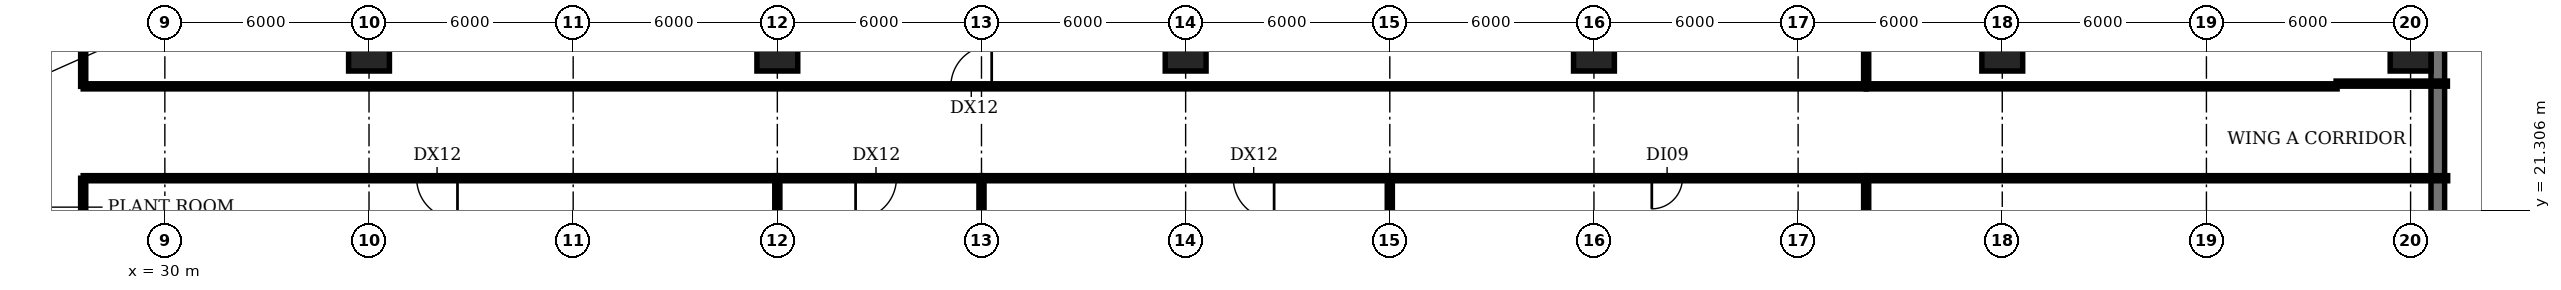
"""IFC4 building model, lengths in metres.
Left out: names, types, materials, properties, quantities, classifications, styles, units other than length and angle.
Written with IfcOpenShell. Run it as: python <this file> out.ifc"""

import sys

from ifc_helpers import new_model, si_unit, direction, frame, frame_2d, origin, origin_2d, place, context, subcontext, project, spatial, rectangle, extrude, element, fill, save


model = new_model("IFC4")
c1 = context("Model", 3, precision=1e-05, world=origin(), true_north=direction((0.0, 1.0)))
c2 = subcontext(c1, "Body", "Model", "MODEL_VIEW")
j1 = project(units=[si_unit("LENGTHUNIT", "METRE"), si_unit("PLANEANGLEUNIT", "RADIAN")], contexts=[c1])
p1 = place(None, origin())
s1 = spatial("IfcSite", under=j1, at=p1, CompositionType="ELEMENT")
p2 = place(p1, origin())
s2 = spatial("IfcBuilding", under=s1, at=p2, CompositionType="ELEMENT")
p3 = place(p2, frame((0.0, 0.0, -6.0)))
s3 = spatial("IfcBuildingStorey", under=s2, at=p3, CompositionType="ELEMENT", Elevation=-6.0)
for number, where, z_axis, x_axis in (
    (1, (36.0, 26.0, -0.3), (0.0, 0.0, 1.0), (1.0, 0.0, 0.0)),
    (2, (48.0, 26.0, -0.3), (0.0, 0.0, 1.0), (1.0, 0.0, 0.0)),
    (3, (60.0, 26.0, -0.3), (0.0, 0.0, 1.0), (1.0, 0.0, 0.0)),
    (4, (72.0, 26.0, -0.3), (0.0, 0.0, 1.0), (1.0, 0.0, 0.0)),
    (5, (84.0, 26.0, -0.3), (0.0, 0.0, 1.0), (1.0, 0.0, 0.0)),
    (6, (96.0, 26.0, -0.3), (0.0, 0.0, 1.0), (1.0, 0.0, 0.0)),
):
    element("IfcColumn", number, at=place(p3, frame(where, z_axis=z_axis, x_axis=x_axis)), inside=s3, PredefinedType="COLUMN", context=c2, shape_type="SweptSolid", body=[
        extrude(rectangle(XDim=1.2, YDim=1.2, at=origin_2d()), origin(), (0.0, 0.0, 1.0), 5.95),
    ])
p4 = place(p3, frame((96.8, -3.249, 0.0), z_axis=(0.0, 0.0, 1.0), x_axis=(0.0, 1.0, 0.0)))
e7 = element("IfcWall", 7, at=p4, inside=s3, PredefinedType="SOLIDWALL", context=c2, shape_type="SweptSolid", body=[
    extrude(rectangle(XDim=66.497, YDim=0.4, at=frame_2d((33.249, 0.0))), origin(), (0.0, 0.0, 1.0), 5.65),
])
p5 = place(p3, frame((27.6, -10.09, 0.0), z_axis=(0.0, 0.0, 1.0), x_axis=(0.0, 1.0, 0.0)))
e8 = element("IfcWall", 8, at=p5, inside=s3, PredefinedType="PARTITIONING", context=c2, shape_type="SweptSolid", body=[
    extrude(rectangle(XDim=32.34, YDim=0.15, at=frame_2d((16.17, 0.0))), origin(), (0.0, 0.0, 1.0), 4.7),
])
p6 = place(p3, frame((27.6, 24.95, 0.0), z_axis=(0.0, 0.0, 1.0), x_axis=(0.0, 1.0, 0.0)))
e9 = element("IfcWall", 9, at=p6, inside=s3, PredefinedType="PARTITIONING", context=c2, shape_type="SweptSolid", body=[
    extrude(rectangle(XDim=45.14, YDim=0.15, at=frame_2d((22.57, 0.0))), origin(), (0.0, 0.0, 1.0), 4.7),
])
p7 = place(p3, frame((27.6, 24.95, 0.0), z_axis=(0.0, 0.0, 1.0), x_axis=(1.0, 0.0, 0.0)))
e10 = element("IfcWall", 10, at=p7, inside=s3, PredefinedType="PARTITIONING", context=c2, shape_type="SweptSolid", body=[
    extrude(rectangle(XDim=52.4, YDim=0.15, at=frame_2d((26.2, 0.0))), origin(), (0.0, 0.0, 1.0), 4.7),
])
p8 = place(p7, frame((25.5, 0.0, 0.0)))
e11 = element("IfcOpeningElement", 11, at=p8, cuts=e10, PredefinedType="OPENING", context=c2, shape_type="SweptSolid", body=[
    extrude(rectangle(XDim=1.2, YDim=2.1, at=frame_2d((0.6, 1.05))), frame((0.0, 0.085, 0.0), z_axis=(0.0, -1.0, 0.0), x_axis=(1.0, 0.0, 0.0)), (0.0, 0.0, 1.0), 0.17),
])
p9 = place(p3, frame((48.0, -10.09, 0.0), z_axis=(0.0, 0.0, 1.0), x_axis=(0.0, 1.0, 0.0)))
e12 = element("IfcWall", 12, at=p9, inside=s3, PredefinedType="PARTITIONING", context=c2, shape_type="SweptSolid", body=[
    extrude(rectangle(XDim=32.34, YDim=0.15, at=frame_2d((16.17, 0.0))), origin(), (0.0, 0.0, 1.0), 4.7),
])
p10 = place(p3, frame((48.0, 22.25, 0.0), z_axis=(0.0, 0.0, 1.0), x_axis=(-1.0, 0.0, 0.0)))
e13 = element("IfcWall", 13, at=p10, inside=s3, PredefinedType="PARTITIONING", context=c2, shape_type="SweptSolid", body=[
    extrude(rectangle(XDim=20.4, YDim=0.15, at=frame_2d((10.2, 0.0))), origin(), (0.0, 0.0, 1.0), 4.7),
])
p11 = place(p10, frame((9.4, 0.0, 0.0)))
e14 = element("IfcOpeningElement", 14, at=p11, cuts=e13, PredefinedType="OPENING", context=c2, shape_type="SweptSolid", body=[
    extrude(rectangle(XDim=1.2, YDim=2.1, at=frame_2d((0.6, 1.05))), frame((0.0, 0.085, 0.0), z_axis=(0.0, -1.0, 0.0), x_axis=(1.0, 0.0, 0.0)), (0.0, 0.0, 1.0), 0.17),
])
p12 = place(p3, frame((54.0, -10.09, 0.0), z_axis=(0.0, 0.0, 1.0), x_axis=(0.0, 1.0, 0.0)))
e15 = element("IfcWall", 15, at=p12, inside=s3, PredefinedType="PARTITIONING", context=c2, shape_type="SweptSolid", body=[
    extrude(rectangle(XDim=32.34, YDim=0.15, at=frame_2d((16.17, 0.0))), origin(), (0.0, 0.0, 1.0), 4.7),
])
p13 = place(p3, frame((54.0, 22.25, 0.0), z_axis=(0.0, 0.0, 1.0), x_axis=(-1.0, 0.0, 0.0)))
e16 = element("IfcWall", 16, at=p13, inside=s3, PredefinedType="PARTITIONING", context=c2, shape_type="SweptSolid", body=[
    extrude(rectangle(XDim=6.0, YDim=0.15, at=frame_2d((3.0, 0.0))), origin(), (0.0, 0.0, 1.0), 4.7),
])
p14 = place(p13, frame((2.5, 0.0, 0.0)))
e17 = element("IfcOpeningElement", 17, at=p14, cuts=e16, PredefinedType="OPENING", context=c2, shape_type="SweptSolid", body=[
    extrude(rectangle(XDim=1.2, YDim=2.1, at=frame_2d((0.6, 1.05))), frame((0.0, 0.085, 0.0), z_axis=(0.0, -1.0, 0.0), x_axis=(1.0, 0.0, 0.0)), (0.0, 0.0, 1.0), 0.17),
])
p15 = place(p3, frame((66.0, -10.09, 0.0), z_axis=(0.0, 0.0, 1.0), x_axis=(0.0, 1.0, 0.0)))
e18 = element("IfcWall", 18, at=p15, inside=s3, PredefinedType="PARTITIONING", context=c2, shape_type="SweptSolid", body=[
    extrude(rectangle(XDim=32.34, YDim=0.15, at=frame_2d((16.17, 0.0))), origin(), (0.0, 0.0, 1.0), 4.7),
])
p16 = place(p3, frame((66.0, 22.25, 0.0), z_axis=(0.0, 0.0, 1.0), x_axis=(-1.0, 0.0, 0.0)))
e19 = element("IfcWall", 19, at=p16, inside=s3, PredefinedType="PARTITIONING", context=c2, shape_type="SweptSolid", body=[
    extrude(rectangle(XDim=12.0, YDim=0.15, at=frame_2d((6.0, 0.0))), origin(), (0.0, 0.0, 1.0), 4.7),
])
p17 = place(p16, frame((3.4, 0.0, 0.0)))
e20 = element("IfcOpeningElement", 20, at=p17, cuts=e19, PredefinedType="OPENING", context=c2, shape_type="SweptSolid", body=[
    extrude(rectangle(XDim=1.2, YDim=2.1, at=frame_2d((0.6, 1.05))), frame((0.0, 0.085, 0.0), z_axis=(0.0, -1.0, 0.0), x_axis=(1.0, 0.0, 0.0)), (0.0, 0.0, 1.0), 0.17),
])
p18 = place(p3, frame((80.0, -3.92, 0.0), z_axis=(0.0, 0.0, 1.0), x_axis=(0.0, 1.0, 0.0)))
e21 = element("IfcWall", 21, at=p18, inside=s3, PredefinedType="PARTITIONING", context=c2, shape_type="SweptSolid", body=[
    extrude(rectangle(XDim=26.17, YDim=0.15, at=frame_2d((13.085, 0.0))), origin(), (0.0, 0.0, 1.0), 4.7),
])
p19 = place(p3, frame((80.0, 22.25, 0.0), z_axis=(0.0, 0.0, 1.0), x_axis=(-1.0, 0.0, 0.0)))
e22 = element("IfcWall", 22, at=p19, inside=s3, PredefinedType="PARTITIONING", context=c2, shape_type="SweptSolid", body=[
    extrude(rectangle(XDim=14.0, YDim=0.15, at=frame_2d((7.0, 0.0))), origin(), (0.0, 0.0, 1.0), 4.7),
])
p20 = place(p19, frame((5.4, 0.0, 0.0)))
e23 = element("IfcOpeningElement", 23, at=p20, cuts=e22, PredefinedType="OPENING", context=c2, shape_type="SweptSolid", body=[
    extrude(rectangle(XDim=0.9, YDim=2.1, at=frame_2d((0.45, 1.05))), frame((0.0, 0.085, 0.0), z_axis=(0.0, -1.0, 0.0), x_axis=(1.0, 0.0, 0.0)), (0.0, 0.0, 1.0), 0.17),
])
p21 = place(p3, frame((80.0, 22.25, 0.0), z_axis=(0.0, 0.0, 1.0), x_axis=(1.0, 0.0, 0.0)))
e24 = element("IfcWall", 24, at=p21, inside=s3, PredefinedType="PARTITIONING", context=c2, shape_type="SweptSolid", body=[
    extrude(rectangle(XDim=17.09, YDim=0.15, at=frame_2d((8.545, 0.0))), origin(), (0.0, 0.0, 1.0), 4.7),
])
p22 = place(p3, frame((80.0, 24.95, 0.0), z_axis=(0.0, 0.0, 1.0), x_axis=(0.0, 1.0, 0.0)))
e25 = element("IfcWall", 25, at=p22, inside=s3, PredefinedType="PARTITIONING", context=c2, shape_type="SweptSolid", body=[
    extrude(rectangle(XDim=45.14, YDim=0.15, at=frame_2d((22.57, 0.0))), origin(), (0.0, 0.0, 1.0), 4.7),
])
p23 = place(p3, frame((80.0, 24.95, 0.0), z_axis=(0.0, 0.0, 1.0), x_axis=(1.0, 0.0, 0.0)))
e26 = element("IfcWall", 26, at=p23, inside=s3, PredefinedType="PARTITIONING", context=c2, shape_type="SweptSolid", body=[
    extrude(rectangle(XDim=13.84, YDim=0.15, at=frame_2d((6.92, 0.0))), origin(), (0.0, 0.0, 1.0), 4.7),
])
p24 = place(p3, frame((93.81, 25.03, 0.0), z_axis=(0.0, 0.0, 1.0), x_axis=(1.0, 0.0, 0.0)))
e27 = element("IfcWall", 27, at=p24, inside=s3, PredefinedType="PARTITIONING", context=c2, shape_type="SweptSolid", body=[
    extrude(rectangle(XDim=3.272, YDim=0.15, at=frame_2d((1.636, 0.0))), origin(), (0.0, 0.0, 1.0), 4.7),
])
p25 = place(p8, origin())
e28 = element("IfcDoor", 28, at=p25, inside=s3, OperationType="SINGLE_SWING_RIGHT", PredefinedType="DOOR", context=c2, shape_type="SweptSolid", body=[
    extrude(rectangle(XDim=1.2, YDim=2.1, at=frame_2d((0.6, 1.05))), frame((0.0, 0.025, 0.0), z_axis=(0.0, -1.0, 0.0), x_axis=(1.0, 0.0, 0.0)), (0.0, 0.0, 1.0), 0.05),
])
fill(e11, e28)
p26 = place(p11, origin())
e29 = element("IfcDoor", 29, at=p26, inside=s3, OperationType="SINGLE_SWING_LEFT", PredefinedType="DOOR", context=c2, shape_type="SweptSolid", body=[
    extrude(rectangle(XDim=1.2, YDim=2.1, at=frame_2d((0.6, 1.05))), frame((0.0, 0.025, 0.0), z_axis=(0.0, -1.0, 0.0), x_axis=(1.0, 0.0, 0.0)), (0.0, 0.0, 1.0), 0.05),
])
fill(e14, e29)
p27 = place(p14, origin())
e30 = element("IfcDoor", 30, at=p27, inside=s3, OperationType="SINGLE_SWING_RIGHT", PredefinedType="DOOR", context=c2, shape_type="SweptSolid", body=[
    extrude(rectangle(XDim=1.2, YDim=2.1, at=frame_2d((0.6, 1.05))), frame((0.0, 0.025, 0.0), z_axis=(0.0, -1.0, 0.0), x_axis=(1.0, 0.0, 0.0)), (0.0, 0.0, 1.0), 0.05),
])
fill(e17, e30)
p28 = place(p17, origin())
e31 = element("IfcDoor", 31, at=p28, inside=s3, OperationType="SINGLE_SWING_LEFT", PredefinedType="DOOR", context=c2, shape_type="SweptSolid", body=[
    extrude(rectangle(XDim=1.2, YDim=2.1, at=frame_2d((0.6, 1.05))), frame((0.0, 0.025, 0.0), z_axis=(0.0, -1.0, 0.0), x_axis=(1.0, 0.0, 0.0)), (0.0, 0.0, 1.0), 0.05),
])
fill(e20, e31)
p29 = place(p20, origin())
e32 = element("IfcDoor", 32, at=p29, inside=s3, OperationType="SINGLE_SWING_RIGHT", PredefinedType="DOOR", context=c2, shape_type="SweptSolid", body=[
    extrude(rectangle(XDim=0.9, YDim=2.1, at=frame_2d((0.45, 1.05))), frame((0.0, 0.025, 0.0), z_axis=(0.0, -1.0, 0.0), x_axis=(1.0, 0.0, 0.0)), (0.0, 0.0, 1.0), 0.05),
])
fill(e23, e32)
save(model, sys.argv[1])
